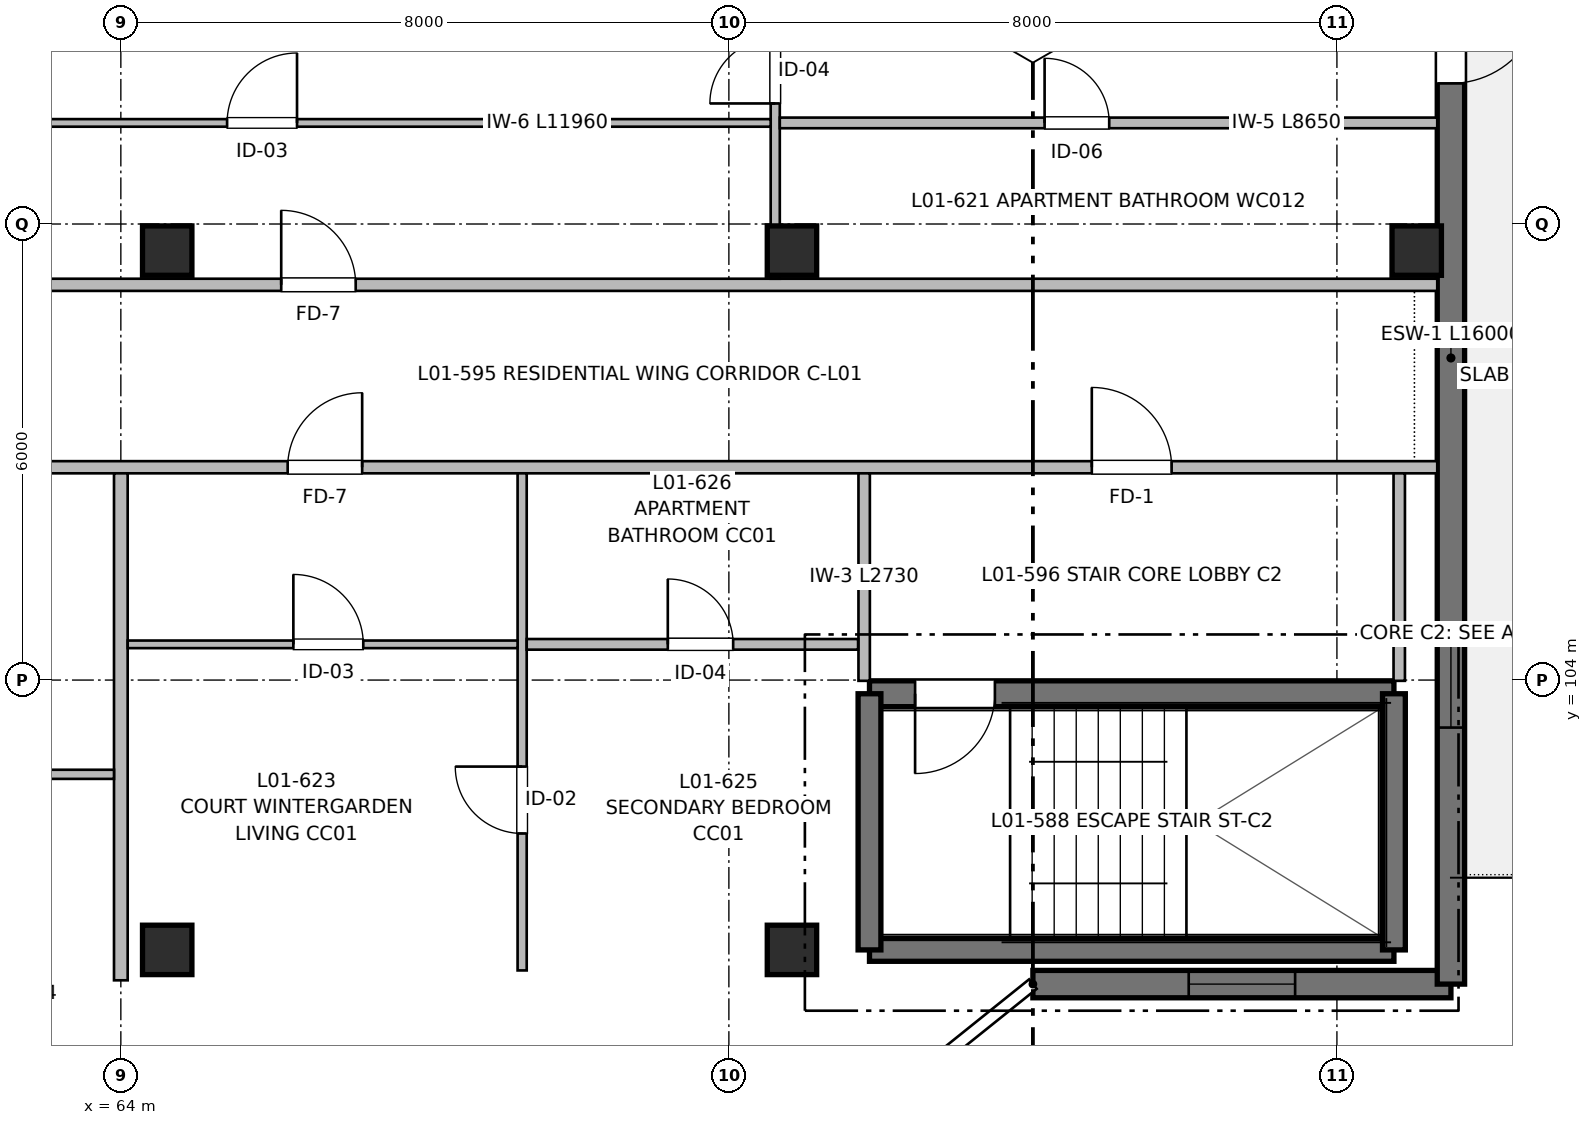
"""IFC4 building model, lengths in metres.
Left out: names, types, materials, properties, quantities, classifications, styles, units other than length and angle.
Written with IfcOpenShell. Run it as: python <this file> out.ifc"""

import sys

from ifc_helpers import new_model, si_unit, direction, frame, frame_2d, origin, origin_2d, place, context, subcontext, project, spatial, rectangle, extrude, element, fill, save


model = new_model("IFC4")
c1 = context("Model", 3, precision=1e-05, world=origin(), true_north=direction((0.0, 1.0)))
c2 = subcontext(c1, "Body", "Model", "MODEL_VIEW")
j1 = project(units=[si_unit("LENGTHUNIT", "METRE"), si_unit("PLANEANGLEUNIT", "RADIAN")], contexts=[c1])
p1 = place(None, origin())
s1 = spatial("IfcSite", under=j1, at=p1, CompositionType="ELEMENT")
p2 = place(p1, origin())
s2 = spatial("IfcBuilding", under=s1, at=p2, CompositionType="ELEMENT")
p3 = place(p2, frame((0.0, 0.0, 4.16)))
s3 = spatial("IfcBuildingStorey", under=s2, at=p3, CompositionType="ELEMENT", Elevation=4.16)
for number, where, z_axis, x_axis in (
    (1, (64.61, 100.45, 0.0), (0.0, 0.0, 1.0), (1.0, 0.0, 0.0)),
    (2, (64.61, 109.65, 0.0), (0.0, 0.0, 1.0), (1.0, 0.0, 0.0)),
    (3, (72.83, 100.45, 0.0), (0.0, 0.0, 1.0), (1.0, 0.0, 0.0)),
    (4, (72.83, 109.65, 0.0), (0.0, 0.0, 1.0), (1.0, 0.0, 0.0)),
    (5, (81.05, 109.65, 0.0), (0.0, 0.0, 1.0), (1.0, 0.0, 0.0)),
):
    element("IfcColumn", number, at=place(p3, frame(where, z_axis=z_axis, x_axis=x_axis)), inside=s3, PredefinedType="COLUMN", context=c2, shape_type="SweptSolid", body=[
        extrude(rectangle(XDim=0.65, YDim=0.65, at=origin_2d()), origin(), (0.0, 0.0, 1.0), 3.2),
    ])
p4 = place(p3, frame((73.85, 100.45, 0.0), z_axis=(0.0, 0.0, 1.0), x_axis=(1.0, 0.0, 0.0)))
e6 = element("IfcWall", 6, at=p4, inside=s3, PredefinedType="SHEAR", context=c2, shape_type="SweptSolid", body=[
    extrude(rectangle(XDim=6.9, YDim=0.3, at=frame_2d((3.45, 0.0))), origin(), (0.0, 0.0, 1.0), 3.2),
])
p5 = place(p3, frame((80.75, 103.82, 0.0), z_axis=(0.0, 0.0, 1.0), x_axis=(-1.0, 0.0, 0.0)))
e7 = element("IfcWall", 7, at=p5, inside=s3, PredefinedType="SHEAR", context=c2, shape_type="SweptSolid", body=[
    extrude(rectangle(XDim=6.9, YDim=0.34, at=frame_2d((3.45, 0.0))), origin(), (0.0, 0.0, 1.0), 3.2),
])
p6 = place(p5, frame((5.25, 0.0, 0.0)))
e8 = element("IfcOpeningElement", 8, at=p6, cuts=e7, PredefinedType="OPENING", context=c2, shape_type="SweptSolid", body=[
    extrude(rectangle(XDim=1.05, YDim=2.15, at=frame_2d((0.525, 1.075))), frame((0.0, 0.18, 0.0), z_axis=(0.0, -1.0, 0.0), x_axis=(1.0, 0.0, 0.0)), (0.0, 0.0, 1.0), 0.36),
])
for number, where, z_axis, x_axis in (
    (9, (73.85, 103.82, 0.0), (0.0, 0.0, 1.0), (0.0, -1.0, 0.0)),
    (10, (80.75, 100.45, 0.0), (0.0, 0.0, 1.0), (0.0, 1.0, 0.0)),
):
    element("IfcWall", number, at=place(p3, frame(where, z_axis=z_axis, x_axis=x_axis)), inside=s3, PredefinedType="SHEAR", context=c2, shape_type="SweptSolid", body=[
        extrude(rectangle(XDim=3.37, YDim=0.3, at=frame_2d((1.685, 0.0))), origin(), (0.0, 0.0, 1.0), 3.2),
    ])
p7 = place(p3, frame((81.5, 100.0, 0.0), z_axis=(0.0, 0.0, 1.0), x_axis=(-1.0, 0.0, 0.0)))
e11 = element("IfcWall", 11, at=p7, inside=s3, PredefinedType="SHEAR", context=c2, shape_type="SweptSolid", body=[
    extrude(rectangle(XDim=5.5, YDim=0.36, at=frame_2d((2.75, 0.0))), origin(), (0.0, 0.0, 1.0), 2.98),
])
p8 = place(p7, frame((2.05, 0.0, 0.87)))
e12 = element("IfcOpeningElement", 12, at=p8, cuts=e11, PredefinedType="OPENING", context=c2, shape_type="SweptSolid", body=[
    extrude(rectangle(XDim=1.4, YDim=1.35, at=frame_2d((0.7, 0.675))), frame((0.0, 0.19, 0.0), z_axis=(0.0, -1.0, 0.0), x_axis=(1.0, 0.0, 0.0)), (0.0, 0.0, 1.0), 0.38),
])
p9 = place(p3, frame((81.5, 116.0, 0.0), z_axis=(0.0, 0.0, 1.0), x_axis=(0.0, -1.0, 0.0)))
e13 = element("IfcWall", 13, at=p9, inside=s3, PredefinedType="SHEAR", context=c2, shape_type="SweptSolid", body=[
    extrude(rectangle(XDim=16.0, YDim=0.36, at=frame_2d((8.0, 0.0))), origin(), (0.0, 0.0, 1.0), 2.98),
])
p10 = place(p9, frame((2.95, 0.0, 0.0)))
e14 = element("IfcOpeningElement", 14, at=p10, cuts=e13, PredefinedType="OPENING", context=c2, shape_type="SweptSolid", body=[
    extrude(rectangle(XDim=1.2, YDim=2.2, at=frame_2d((0.6, 1.1))), frame((0.0, 0.19, 0.0), z_axis=(0.0, -1.0, 0.0), x_axis=(1.0, 0.0, 0.0)), (0.0, 0.0, 1.0), 0.38),
])
p11 = place(p9, frame((11.375, 0.0, 0.87)))
e15 = element("IfcOpeningElement", 15, at=p11, cuts=e13, PredefinedType="OPENING", context=c2, shape_type="SweptSolid", body=[
    extrude(rectangle(XDim=1.25, YDim=1.35, at=frame_2d((0.625, 0.675))), frame((0.0, 0.19, 0.0), z_axis=(0.0, -1.0, 0.0), x_axis=(1.0, 0.0, 0.0)), (0.0, 0.0, 1.0), 0.38),
])
p12 = place(p3, frame((57.2, 106.8, 0.0), z_axis=(0.0, 0.0, 1.0), x_axis=(1.0, 0.0, 0.0)))
e16 = element("IfcWall", 16, at=p12, inside=s3, PredefinedType="PARTITIONING", context=c2, shape_type="SweptSolid", body=[
    extrude(rectangle(XDim=24.12, YDim=0.16, at=frame_2d((12.06, 0.0))), origin(), (0.0, 0.0, 1.0), 2.935),
])
p13 = place(p12, frame((19.575, 0.0, 0.0)))
e17 = element("IfcOpeningElement", 17, at=p13, cuts=e16, PredefinedType="OPENING", context=c2, shape_type="SweptSolid", body=[
    extrude(rectangle(XDim=1.05, YDim=2.15, at=frame_2d((0.525, 1.075))), frame((0.0, 0.09, 0.0), z_axis=(0.0, -1.0, 0.0), x_axis=(1.0, 0.0, 0.0)), (0.0, 0.0, 1.0), 0.18),
])
p14 = place(p12, frame((8.995, 0.0, 0.0)))
e18 = element("IfcOpeningElement", 18, at=p14, cuts=e16, PredefinedType="OPENING", context=c2, shape_type="SweptSolid", body=[
    extrude(rectangle(XDim=0.98, YDim=2.15, at=frame_2d((0.49, 1.075))), frame((0.0, 0.09, 0.0), z_axis=(0.0, -1.0, 0.0), x_axis=(1.0, 0.0, 0.0)), (0.0, 0.0, 1.0), 0.18),
])
p15 = place(p3, frame((39.68, 109.2, 0.0), z_axis=(0.0, 0.0, 1.0), x_axis=(1.0, 0.0, 0.0)))
e19 = element("IfcWall", 19, at=p15, inside=s3, PredefinedType="PARTITIONING", context=c2, shape_type="SweptSolid", body=[
    extrude(rectangle(XDim=41.64, YDim=0.16, at=frame_2d((20.82, 0.0))), origin(), (0.0, 0.0, 1.0), 2.935),
])
p16 = place(p15, frame((5.52, 0.0, 0.0)))
e20 = element("IfcOpeningElement", 20, at=p16, cuts=e19, PredefinedType="OPENING", context=c2, shape_type="SweptSolid", body=[
    extrude(rectangle(XDim=0.98, YDim=2.15, at=frame_2d((0.49, 1.075))), frame((0.0, 0.09, 0.0), z_axis=(0.0, -1.0, 0.0), x_axis=(1.0, 0.0, 0.0)), (0.0, 0.0, 1.0), 0.18),
])
p17 = place(p15, frame((26.43, 0.0, 0.0)))
e21 = element("IfcOpeningElement", 21, at=p17, cuts=e19, PredefinedType="OPENING", context=c2, shape_type="SweptSolid", body=[
    extrude(rectangle(XDim=0.98, YDim=2.15, at=frame_2d((0.49, 1.075))), frame((0.0, 0.09, 0.0), z_axis=(0.0, -1.0, 0.0), x_axis=(1.0, 0.0, 0.0)), (0.0, 0.0, 1.0), 0.18),
])
p18 = place(p3, frame((64.0, 100.05, 0.0), z_axis=(0.0, 0.0, 1.0), x_axis=(0.0, 1.0, 0.0)))
e22 = element("IfcWall", 22, at=p18, inside=s3, PredefinedType="PARTITIONING", context=c2, shape_type="SweptSolid", body=[
    extrude(rectangle(XDim=6.67, YDim=0.18, at=frame_2d((3.335, 0.0))), origin(), (0.0, 0.0, 1.0), 2.935),
])
for number, where, z_axis, x_axis in (
    (23, (73.78, 103.99, 0.0), (0.0, 0.0, 1.0), (0.0, 1.0, 0.0)),
    (24, (80.82, 103.99, 0.0), (0.0, 0.0, 1.0), (0.0, 1.0, 0.0)),
):
    element("IfcWall", number, at=place(p3, frame(where, z_axis=z_axis, x_axis=x_axis)), inside=s3, PredefinedType="PARTITIONING", context=c2, shape_type="SweptSolid", body=[
        extrude(rectangle(XDim=2.73, YDim=0.15, at=frame_2d((1.365, 0.0))), origin(), (0.0, 0.0, 1.0), 2.935),
    ])
p19 = place(p3, frame((59.72, 102.76, 0.0), z_axis=(0.0, 0.0, 1.0), x_axis=(1.0, 0.0, 0.0)))
e25 = element("IfcWall", 25, at=p19, inside=s3, PredefinedType="PARTITIONING", context=c2, shape_type="SweptSolid", body=[
    extrude(rectangle(XDim=4.19, YDim=0.12, at=frame_2d((2.095, 0.0))), origin(), (0.0, 0.0, 1.0), 2.935),
])
p20 = place(p19, frame((1.645, 0.0, 0.0)))
e26 = element("IfcOpeningElement", 26, at=p20, cuts=e25, PredefinedType="OPENING", context=c2, shape_type="SweptSolid", body=[
    extrude(rectangle(XDim=0.9, YDim=2.1, at=frame_2d((0.45, 1.05))), frame((0.0, 0.07, 0.0), z_axis=(0.0, -1.0, 0.0), x_axis=(1.0, 0.0, 0.0)), (0.0, 0.0, 1.0), 0.14),
])
p21 = place(p3, frame((72.61, 109.28, 0.0), z_axis=(0.0, 0.0, 1.0), x_axis=(0.0, 1.0, 0.0)))
e27 = element("IfcWall", 27, at=p21, inside=s3, PredefinedType="PARTITIONING", context=c2, shape_type="SweptSolid", body=[
    extrude(rectangle(XDim=6.59, YDim=0.12, at=frame_2d((3.295, 0.0))), origin(), (0.0, 0.0, 1.0), 2.935),
])
p22 = place(p21, frame((2.306, 0.0, 0.0)))
e28 = element("IfcOpeningElement", 28, at=p22, cuts=e27, PredefinedType="OPENING", context=c2, shape_type="SweptSolid", body=[
    extrude(rectangle(XDim=0.86, YDim=2.1, at=frame_2d((0.43, 1.05))), frame((0.0, 0.07, 0.0), z_axis=(0.0, -1.0, 0.0), x_axis=(1.0, 0.0, 0.0)), (0.0, 0.0, 1.0), 0.14),
])
p23 = place(p21, frame((4.093, 0.0, 0.0)))
e29 = element("IfcOpeningElement", 29, at=p23, cuts=e27, PredefinedType="OPENING", context=c2, shape_type="SweptSolid", body=[
    extrude(rectangle(XDim=0.9, YDim=2.1, at=frame_2d((0.45, 1.05))), frame((0.0, 0.07, 0.0), z_axis=(0.0, -1.0, 0.0), x_axis=(1.0, 0.0, 0.0)), (0.0, 0.0, 1.0), 0.14),
])
p24 = place(p3, frame((72.67, 111.33, 0.0), z_axis=(0.0, 0.0, 1.0), x_axis=(1.0, 0.0, 0.0)))
e30 = element("IfcWall", 30, at=p24, inside=s3, PredefinedType="PARTITIONING", context=c2, shape_type="SweptSolid", body=[
    extrude(rectangle(XDim=8.65, YDim=0.14, at=frame_2d((4.325, 0.0))), origin(), (0.0, 0.0, 1.0), 2.935),
])
p25 = place(p24, frame((3.484, 0.0, 0.0)))
e31 = element("IfcOpeningElement", 31, at=p25, cuts=e30, PredefinedType="OPENING", context=c2, shape_type="SweptSolid", body=[
    extrude(rectangle(XDim=0.85, YDim=2.05, at=frame_2d((0.425, 1.025))), frame((0.0, 0.08, 0.0), z_axis=(0.0, -1.0, 0.0), x_axis=(1.0, 0.0, 0.0)), (0.0, 0.0, 1.0), 0.16),
])
p26 = place(p3, frame((60.59, 111.33, 0.0), z_axis=(0.0, 0.0, 1.0), x_axis=(1.0, 0.0, 0.0)))
e32 = element("IfcWall", 32, at=p26, inside=s3, PredefinedType="PARTITIONING", context=c2, shape_type="SweptSolid", body=[
    extrude(rectangle(XDim=11.96, YDim=0.1, at=frame_2d((5.98, 0.0))), origin(), (0.0, 0.0, 1.0), 2.935),
])
p27 = place(p26, frame((4.808, 0.0, 0.0)))
e33 = element("IfcOpeningElement", 33, at=p27, cuts=e32, PredefinedType="OPENING", context=c2, shape_type="SweptSolid", body=[
    extrude(rectangle(XDim=0.92, YDim=2.1, at=frame_2d((0.46, 1.05))), frame((0.0, 0.06, 0.0), z_axis=(0.0, -1.0, 0.0), x_axis=(1.0, 0.0, 0.0)), (0.0, 0.0, 1.0), 0.12),
])
p28 = place(p3, frame((69.28, 100.18, 0.0), z_axis=(0.0, 0.0, 1.0), x_axis=(0.0, 1.0, 0.0)))
e34 = element("IfcWall", 34, at=p28, inside=s3, PredefinedType="PARTITIONING", context=c2, shape_type="SweptSolid", body=[
    extrude(rectangle(XDim=6.54, YDim=0.12, at=frame_2d((3.27, 0.0))), origin(), (0.0, 0.0, 1.0), 2.935),
])
p29 = place(p28, frame((1.802, 0.0, 0.0)))
e35 = element("IfcOpeningElement", 35, at=p29, cuts=e34, PredefinedType="OPENING", context=c2, shape_type="SweptSolid", body=[
    extrude(rectangle(XDim=0.88, YDim=2.1, at=frame_2d((0.44, 1.05))), frame((0.0, 0.07, 0.0), z_axis=(0.0, -1.0, 0.0), x_axis=(1.0, 0.0, 0.0)), (0.0, 0.0, 1.0), 0.14),
])
p30 = place(p3, frame((69.34, 104.47, 0.0), z_axis=(0.0, 0.0, 1.0), x_axis=(1.0, 0.0, 0.0)))
e36 = element("IfcWall", 36, at=p30, inside=s3, PredefinedType="PARTITIONING", context=c2, shape_type="SweptSolid", body=[
    extrude(rectangle(XDim=4.36, YDim=0.14, at=frame_2d((2.18, 0.0))), origin(), (0.0, 0.0, 1.0), 2.935),
])
p31 = place(p30, frame((1.856, 0.0, 0.0)))
e37 = element("IfcOpeningElement", 37, at=p31, cuts=e36, PredefinedType="OPENING", context=c2, shape_type="SweptSolid", body=[
    extrude(rectangle(XDim=0.86, YDim=2.1, at=frame_2d((0.43, 1.05))), frame((0.0, 0.08, 0.0), z_axis=(0.0, -1.0, 0.0), x_axis=(1.0, 0.0, 0.0)), (0.0, 0.0, 1.0), 0.16),
])
p32 = place(p3, frame((64.09, 104.47, 0.0), z_axis=(0.0, 0.0, 1.0), x_axis=(1.0, 0.0, 0.0)))
e38 = element("IfcWall", 38, at=p32, inside=s3, PredefinedType="PARTITIONING", context=c2, shape_type="SweptSolid", body=[
    extrude(rectangle(XDim=5.13, YDim=0.1, at=frame_2d((2.565, 0.0))), origin(), (0.0, 0.0, 1.0), 2.935),
])
p33 = place(p32, frame((2.18, 0.0, 0.0)))
e39 = element("IfcOpeningElement", 39, at=p33, cuts=e38, PredefinedType="OPENING", context=c2, shape_type="SweptSolid", body=[
    extrude(rectangle(XDim=0.92, YDim=2.1, at=frame_2d((0.46, 1.05))), frame((0.0, 0.06, 0.0), z_axis=(0.0, -1.0, 0.0), x_axis=(1.0, 0.0, 0.0)), (0.0, 0.0, 1.0), 0.12),
])
p34 = place(p6, origin())
e40 = element("IfcDoor", 40, at=p34, inside=s3, OperationType="SINGLE_SWING_RIGHT", PredefinedType="DOOR", context=c2, shape_type="SweptSolid", body=[
    extrude(rectangle(XDim=1.05, YDim=2.15, at=frame_2d((0.525, 1.075))), frame((0.0, 0.025, 0.0), z_axis=(0.0, -1.0, 0.0), x_axis=(1.0, 0.0, 0.0)), (0.0, 0.0, 1.0), 0.05),
])
fill(e8, e40)
p35 = place(p8, origin())
e41 = element("IfcWindow", 41, at=p35, inside=s3, PartitioningType="SINGLE_PANEL", PredefinedType="WINDOW", context=c2, shape_type="SweptSolid", body=[
    extrude(rectangle(XDim=1.4, YDim=1.35, at=frame_2d((0.7, 0.675))), frame((0.0, 0.03, 0.0), z_axis=(0.0, -1.0, 0.0), x_axis=(1.0, 0.0, 0.0)), (0.0, 0.0, 1.0), 0.06),
])
fill(e12, e41)
p36 = place(p10, origin())
e42 = element("IfcDoor", 42, at=p36, inside=s3, OperationType="SINGLE_SWING_LEFT", PredefinedType="DOOR", context=c2, shape_type="SweptSolid", body=[
    extrude(rectangle(XDim=1.2, YDim=2.2, at=frame_2d((0.6, 1.1))), frame((0.0, 0.025, 0.0), z_axis=(0.0, -1.0, 0.0), x_axis=(1.0, 0.0, 0.0)), (0.0, 0.0, 1.0), 0.05),
])
fill(e14, e42)
p37 = place(p11, origin())
e43 = element("IfcWindow", 43, at=p37, inside=s3, PartitioningType="SINGLE_PANEL", PredefinedType="WINDOW", context=c2, shape_type="SweptSolid", body=[
    extrude(rectangle(XDim=1.25, YDim=1.35, at=frame_2d((0.625, 0.675))), frame((0.0, 0.03, 0.0), z_axis=(0.0, -1.0, 0.0), x_axis=(1.0, 0.0, 0.0)), (0.0, 0.0, 1.0), 0.06),
])
fill(e15, e43)
p38 = place(p13, origin())
e44 = element("IfcDoor", 44, at=p38, inside=s3, OperationType="SINGLE_SWING_LEFT", PredefinedType="DOOR", context=c2, shape_type="SweptSolid", body=[
    extrude(rectangle(XDim=1.05, YDim=2.15, at=frame_2d((0.525, 1.075))), frame((0.0, 0.025, 0.0), z_axis=(0.0, -1.0, 0.0), x_axis=(1.0, 0.0, 0.0)), (0.0, 0.0, 1.0), 0.05),
])
fill(e17, e44)
p39 = place(p17, origin())
e45 = element("IfcDoor", 45, at=p39, inside=s3, OperationType="SINGLE_SWING_LEFT", PredefinedType="DOOR", context=c2, shape_type="SweptSolid", body=[
    extrude(rectangle(XDim=0.98, YDim=2.15, at=frame_2d((0.49, 1.075))), frame((0.0, 0.025, 0.0), z_axis=(0.0, -1.0, 0.0), x_axis=(1.0, 0.0, 0.0)), (0.0, 0.0, 1.0), 0.05),
])
fill(e21, e45)
p40 = place(p27, origin())
e46 = element("IfcDoor", 46, at=p40, inside=s3, OperationType="SINGLE_SWING_RIGHT", PredefinedType="DOOR", context=c2, shape_type="SweptSolid", body=[
    extrude(rectangle(XDim=0.92, YDim=2.1, at=frame_2d((0.46, 1.05))), frame((0.0, 0.025, 0.0), z_axis=(0.0, -1.0, 0.0), x_axis=(1.0, 0.0, 0.0)), (0.0, 0.0, 1.0), 0.05),
])
fill(e33, e46)
p41 = place(p22, origin())
e47 = element("IfcDoor", 47, at=p41, inside=s3, OperationType="SINGLE_SWING_LEFT", PredefinedType="DOOR", context=c2, shape_type="SweptSolid", body=[
    extrude(rectangle(XDim=0.86, YDim=2.1, at=frame_2d((0.43, 1.05))), frame((0.0, 0.025, 0.0), z_axis=(0.0, -1.0, 0.0), x_axis=(1.0, 0.0, 0.0)), (0.0, 0.0, 1.0), 0.05),
])
fill(e28, e47)
p42 = place(p25, origin())
e48 = element("IfcDoor", 48, at=p42, inside=s3, OperationType="SINGLE_SWING_LEFT", PredefinedType="DOOR", context=c2, shape_type="SweptSolid", body=[
    extrude(rectangle(XDim=0.85, YDim=2.05, at=frame_2d((0.425, 1.025))), frame((0.0, 0.025, 0.0), z_axis=(0.0, -1.0, 0.0), x_axis=(1.0, 0.0, 0.0)), (0.0, 0.0, 1.0), 0.05),
])
fill(e31, e48)
p43 = place(p14, origin())
e49 = element("IfcDoor", 49, at=p43, inside=s3, OperationType="SINGLE_SWING_RIGHT", PredefinedType="DOOR", context=c2, shape_type="SweptSolid", body=[
    extrude(rectangle(XDim=0.98, YDim=2.15, at=frame_2d((0.49, 1.075))), frame((0.0, 0.025, 0.0), z_axis=(0.0, -1.0, 0.0), x_axis=(1.0, 0.0, 0.0)), (0.0, 0.0, 1.0), 0.05),
])
fill(e18, e49)
p44 = place(p33, origin())
e50 = element("IfcDoor", 50, at=p44, inside=s3, OperationType="SINGLE_SWING_LEFT", PredefinedType="DOOR", context=c2, shape_type="SweptSolid", body=[
    extrude(rectangle(XDim=0.92, YDim=2.1, at=frame_2d((0.46, 1.05))), frame((0.0, 0.025, 0.0), z_axis=(0.0, -1.0, 0.0), x_axis=(1.0, 0.0, 0.0)), (0.0, 0.0, 1.0), 0.05),
])
fill(e39, e50)
p45 = place(p29, origin())
e51 = element("IfcDoor", 51, at=p45, inside=s3, OperationType="SINGLE_SWING_RIGHT", PredefinedType="DOOR", context=c2, shape_type="SweptSolid", body=[
    extrude(rectangle(XDim=0.88, YDim=2.1, at=frame_2d((0.44, 1.05))), frame((0.0, 0.025, 0.0), z_axis=(0.0, -1.0, 0.0), x_axis=(1.0, 0.0, 0.0)), (0.0, 0.0, 1.0), 0.05),
])
fill(e35, e51)
p46 = place(p31, origin())
e52 = element("IfcDoor", 52, at=p46, inside=s3, OperationType="SINGLE_SWING_LEFT", PredefinedType="DOOR", context=c2, shape_type="SweptSolid", body=[
    extrude(rectangle(XDim=0.86, YDim=2.1, at=frame_2d((0.43, 1.05))), frame((0.0, 0.025, 0.0), z_axis=(0.0, -1.0, 0.0), x_axis=(1.0, 0.0, 0.0)), (0.0, 0.0, 1.0), 0.05),
])
fill(e37, e52)
save(model, sys.argv[1])
